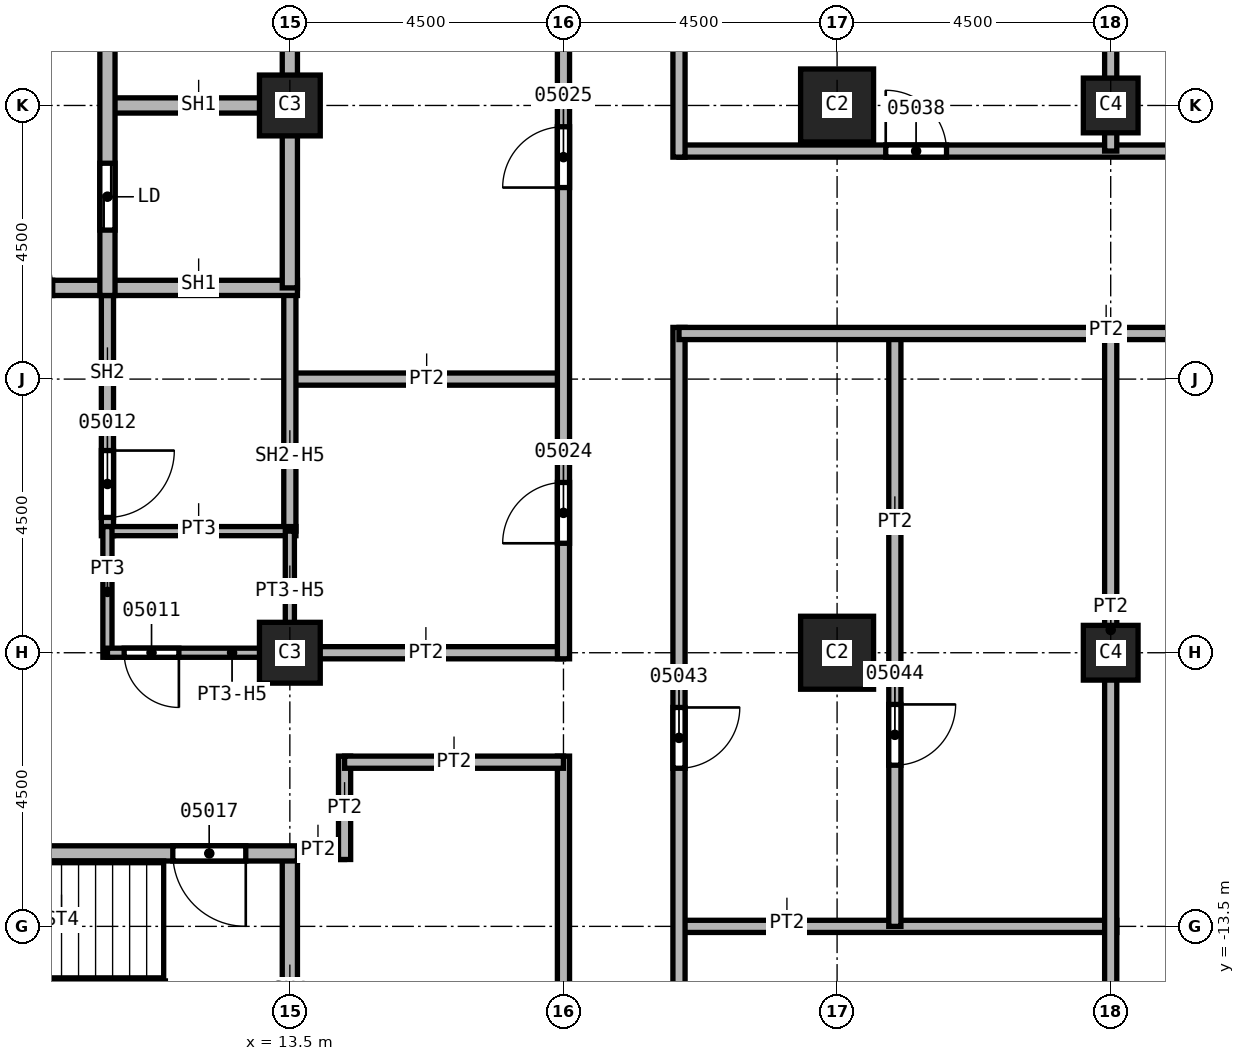
"""IFC4 building model, lengths in metres.
Left out: names, types, materials, properties, quantities, classifications, styles, units other than length and angle.
Written with IfcOpenShell. Run it as: python <this file> out.ifc"""

import sys

from ifc_helpers import new_model, si_unit, direction, frame, frame_2d, origin, origin_2d, place, context, subcontext, project, spatial, rectangle, extrude, element, fill, save


model = new_model("IFC4")
c1 = context("Model", 3, precision=1e-05, world=origin(), true_north=direction((0.0, 1.0)))
c2 = subcontext(c1, "Body", "Model", "MODEL_VIEW")
j1 = project(units=[si_unit("LENGTHUNIT", "METRE"), si_unit("PLANEANGLEUNIT", "RADIAN")], contexts=[c1])
p1 = place(None, origin())
s1 = spatial("IfcSite", under=j1, at=p1, CompositionType="ELEMENT")
p2 = place(p1, origin())
s2 = spatial("IfcBuilding", under=s1, at=p2, CompositionType="ELEMENT")
p3 = place(p2, frame((0.0, 0.0, 116.0)))
s3 = spatial("IfcBuildingStorey", under=s2, at=p3, CompositionType="ELEMENT", Elevation=116.0)
for number, where, z_axis, x_axis in (
    (1, (22.5, 0.0, 0.0), (0.0, 0.0, 1.0), (1.0, 0.0, 0.0)),
    (2, (22.5, -9.0, 0.0), (0.0, 0.0, 1.0), (1.0, 0.0, 0.0)),
):
    element("IfcColumn", number, at=place(p3, frame(where, z_axis=z_axis, x_axis=x_axis)), inside=s3, PredefinedType="COLUMN", context=c2, shape_type="SweptSolid", body=[
        extrude(rectangle(XDim=1.2, YDim=1.2, at=origin_2d()), origin(), (0.0, 0.0, 1.0), 3.6),
    ])
for number, where, z_axis, x_axis in (
    (3, (13.5, 0.0, 0.0), (0.0, 0.0, 1.0), (1.0, 0.0, 0.0)),
    (4, (13.5, -9.0, 0.0), (0.0, 0.0, 1.0), (1.0, 0.0, 0.0)),
):
    element("IfcColumn", number, at=place(p3, frame(where, z_axis=z_axis, x_axis=x_axis)), inside=s3, PredefinedType="COLUMN", context=c2, shape_type="SweptSolid", body=[
        extrude(rectangle(XDim=1.0, YDim=1.0, at=origin_2d()), origin(), (0.0, 0.0, 1.0), 3.6),
    ])
for number, where, z_axis, x_axis in (
    (5, (27.0, 0.0, 0.0), (0.0, 0.0, 1.0), (1.0, 0.0, 0.0)),
    (6, (27.0, -9.0, 0.0), (0.0, 0.0, 1.0), (1.0, 0.0, 0.0)),
):
    element("IfcColumn", number, at=place(p3, frame(where, z_axis=z_axis, x_axis=x_axis)), inside=s3, PredefinedType="COLUMN", context=c2, shape_type="SweptSolid", body=[
        extrude(rectangle(XDim=0.9, YDim=0.9, at=origin_2d()), origin(), (0.0, 0.0, 1.0), 3.6),
    ])
for number, where, z_axis, x_axis in (
    (7, (13.5, -9.0, 0.0), (0.0, 0.0, 1.0), (1.0, 0.0, 0.0)),
    (8, (13.5, -4.5, 0.0), (0.0, 0.0, 1.0), (1.0, 0.0, 0.0)),
):
    element("IfcWall", number, at=place(p3, frame(where, z_axis=z_axis, x_axis=x_axis)), inside=s3, PredefinedType="PARTITIONING", context=c2, shape_type="SweptSolid", body=[
        extrude(rectangle(XDim=4.5, YDim=0.2, at=frame_2d((2.25, 0.0))), origin(), (0.0, 0.0, 1.0), 3.6),
    ])
p4 = place(p3, frame((14.4, -12.3, 0.0), z_axis=(0.0, 0.0, 1.0), x_axis=(-1.0, 0.0, 0.0)))
e9 = element("IfcWall", 9, at=p4, inside=s3, PredefinedType="PARTITIONING", context=c2, shape_type="SweptSolid", body=[
    extrude(rectangle(XDim=1.025, YDim=0.2, at=frame_2d((0.512, 0.0))), origin(), (0.0, 0.0, 1.0), 3.6),
])
p5 = place(p3, frame((14.4, -10.7, 0.0), z_axis=(0.0, 0.0, 1.0), x_axis=(0.0, -1.0, 0.0)))
e10 = element("IfcWall", 10, at=p5, inside=s3, PredefinedType="PARTITIONING", context=c2, shape_type="SweptSolid", body=[
    extrude(rectangle(XDim=1.7, YDim=0.2, at=frame_2d((0.85, 0.0))), origin(), (0.0, 0.0, 1.0), 3.6),
])
p6 = place(p3, frame((18.0, -24.2, 0.0), z_axis=(0.0, 0.0, 1.0), x_axis=(0.0, 1.0, 0.0)))
e11 = element("IfcWall", 11, at=p6, inside=s3, PredefinedType="PARTITIONING", context=c2, shape_type="SweptSolid", body=[
    extrude(rectangle(XDim=13.5, YDim=0.2, at=frame_2d((6.75, 0.0))), origin(), (0.0, 0.0, 1.0), 3.6),
])
p7 = place(p6, frame((6.4, 0.0, 0.0)))
e12 = element("IfcOpeningElement", 12, at=p7, cuts=e11, PredefinedType="OPENING", context=c2, shape_type="SweptSolid", body=[
    extrude(rectangle(XDim=1.0, YDim=2.1, at=frame_2d((0.5, 1.05))), frame((0.0, 0.1, 0.0), z_axis=(0.0, -1.0, 0.0), x_axis=(1.0, 0.0, 0.0)), (0.0, 0.0, 1.0), 0.2),
])
p8 = place(p3, frame((18.0, -10.8, 0.0), z_axis=(0.0, 0.0, 1.0), x_axis=(-1.0, 0.0, 0.0)))
e13 = element("IfcWall", 13, at=p8, inside=s3, PredefinedType="PARTITIONING", context=c2, shape_type="SweptSolid", body=[
    extrude(rectangle(XDim=3.6, YDim=0.2, at=frame_2d((1.8, 0.0))), origin(), (0.0, 0.0, 1.0), 3.6),
])
p9 = place(p3, frame((18.0, -9.1, 0.0), z_axis=(0.0, 0.0, 1.0), x_axis=(0.0, 1.0, 0.0)))
e14 = element("IfcWall", 14, at=p9, inside=s3, PredefinedType="PARTITIONING", context=c2, shape_type="SweptSolid", body=[
    extrude(rectangle(XDim=18.2, YDim=0.2, at=frame_2d((9.1, 0.0))), origin(), (0.0, 0.0, 1.0), 3.6),
])
p10 = place(p9, frame((1.9, 0.0, 0.0)))
e15 = element("IfcOpeningElement", 15, at=p10, cuts=e14, PredefinedType="OPENING", context=c2, shape_type="SweptSolid", body=[
    extrude(rectangle(XDim=1.0, YDim=2.1, at=frame_2d((0.5, 1.05))), frame((0.0, 0.1, 0.0), z_axis=(0.0, -1.0, 0.0), x_axis=(1.0, 0.0, 0.0)), (0.0, 0.0, 1.0), 0.2),
])
p11 = place(p9, frame((7.75, 0.0, 0.0)))
e16 = element("IfcOpeningElement", 16, at=p11, cuts=e14, PredefinedType="OPENING", context=c2, shape_type="SweptSolid", body=[
    extrude(rectangle(XDim=1.0, YDim=2.1, at=frame_2d((0.5, 1.05))), frame((0.0, 0.1, 0.0), z_axis=(0.0, -1.0, 0.0), x_axis=(1.0, 0.0, 0.0)), (0.0, 0.0, 1.0), 0.2),
])
p12 = place(p9, frame((13.75, 0.0, 0.0)))
e17 = element("IfcOpeningElement", 17, at=p12, cuts=e14, PredefinedType="OPENING", context=c2, shape_type="SweptSolid", body=[
    extrude(rectangle(XDim=1.0, YDim=2.1, at=frame_2d((0.5, 1.05))), frame((0.0, 0.1, 0.0), z_axis=(0.0, -1.0, 0.0), x_axis=(1.0, 0.0, 0.0)), (0.0, 0.0, 1.0), 0.2),
])
p13 = place(p3, frame((19.9, -13.5, 0.0), z_axis=(0.0, 0.0, 1.0), x_axis=(1.0, 0.0, 0.0)))
e18 = element("IfcWall", 18, at=p13, inside=s3, PredefinedType="PARTITIONING", context=c2, shape_type="SweptSolid", body=[
    extrude(rectangle(XDim=7.2, YDim=0.2, at=frame_2d((3.6, 0.0))), origin(), (0.0, 0.0, 1.0), 3.6),
])
p14 = place(p3, frame((19.9, -3.65, 0.0), z_axis=(0.0, 0.0, 1.0), x_axis=(0.0, -1.0, 0.0)))
e19 = element("IfcWall", 19, at=p14, inside=s3, PredefinedType="PARTITIONING", context=c2, shape_type="SweptSolid", body=[
    extrude(rectangle(XDim=20.85, YDim=0.2, at=frame_2d((10.425, 0.0))), origin(), (0.0, 0.0, 1.0), 3.6),
])
p15 = place(p14, frame((17.5, 0.0, 0.0)))
e20 = element("IfcOpeningElement", 20, at=p15, cuts=e19, PredefinedType="OPENING", context=c2, shape_type="SweptSolid", body=[
    extrude(rectangle(XDim=1.0, YDim=2.1, at=frame_2d((0.5, 1.05))), frame((0.0, 0.1, 0.0), z_axis=(0.0, -1.0, 0.0), x_axis=(1.0, 0.0, 0.0)), (0.0, 0.0, 1.0), 0.2),
])
p16 = place(p14, frame((6.25, 0.0, 0.0)))
e21 = element("IfcOpeningElement", 21, at=p16, cuts=e19, PredefinedType="OPENING", context=c2, shape_type="SweptSolid", body=[
    extrude(rectangle(XDim=1.0, YDim=2.1, at=frame_2d((0.5, 1.05))), frame((0.0, 0.1, 0.0), z_axis=(0.0, -1.0, 0.0), x_axis=(1.0, 0.0, 0.0)), (0.0, 0.0, 1.0), 0.2),
])
p17 = place(p3, frame((19.9, -0.75, 0.0), z_axis=(0.0, 0.0, 1.0), x_axis=(1.0, 0.0, 0.0)))
e22 = element("IfcWall", 22, at=p17, inside=s3, PredefinedType="PARTITIONING", context=c2, shape_type="SweptSolid", body=[
    extrude(rectangle(XDim=13.95, YDim=0.2, at=frame_2d((6.975, 0.0))), origin(), (0.0, 0.0, 1.0), 3.6),
])
p18 = place(p17, frame((3.4, 0.0, 0.0)))
e23 = element("IfcOpeningElement", 23, at=p18, cuts=e22, PredefinedType="OPENING", context=c2, shape_type="SweptSolid", body=[
    extrude(rectangle(XDim=1.0, YDim=2.1, at=frame_2d((0.5, 1.05))), frame((0.0, 0.1, 0.0), z_axis=(0.0, -1.0, 0.0), x_axis=(1.0, 0.0, 0.0)), (0.0, 0.0, 1.0), 0.2),
])
p19 = place(p3, frame((19.9, 24.5, 0.0), z_axis=(0.0, 0.0, 1.0), x_axis=(0.0, -1.0, 0.0)))
e24 = element("IfcWall", 24, at=p19, inside=s3, PredefinedType="PARTITIONING", context=c2, shape_type="SweptSolid", body=[
    extrude(rectangle(XDim=25.35, YDim=0.2, at=frame_2d((12.675, 0.0))), origin(), (0.0, 0.0, 1.0), 3.6),
])
p20 = place(p19, frame((15.2, 0.0, 0.0)))
e25 = element("IfcOpeningElement", 25, at=p20, cuts=e24, PredefinedType="OPENING", context=c2, shape_type="SweptSolid", body=[
    extrude(rectangle(XDim=1.0, YDim=2.1, at=frame_2d((0.5, 1.05))), frame((0.0, 0.1, 0.0), z_axis=(0.0, -1.0, 0.0), x_axis=(1.0, 0.0, 0.0)), (0.0, 0.0, 1.0), 0.2),
])
p21 = place(p19, frame((7.55, 0.0, 0.0)))
e26 = element("IfcOpeningElement", 26, at=p21, cuts=e24, PredefinedType="OPENING", context=c2, shape_type="SweptSolid", body=[
    extrude(rectangle(XDim=1.0, YDim=2.1, at=frame_2d((0.5, 1.05))), frame((0.0, 0.1, 0.0), z_axis=(0.0, -1.0, 0.0), x_axis=(1.0, 0.0, 0.0)), (0.0, 0.0, 1.0), 0.2),
])
p22 = place(p19, frame((0.55, 0.0, 0.0)))
e27 = element("IfcOpeningElement", 27, at=p22, cuts=e24, PredefinedType="OPENING", context=c2, shape_type="SweptSolid", body=[
    extrude(rectangle(XDim=1.0, YDim=2.1, at=frame_2d((0.5, 1.05))), frame((0.0, 0.1, 0.0), z_axis=(0.0, -1.0, 0.0), x_axis=(1.0, 0.0, 0.0)), (0.0, 0.0, 1.0), 0.2),
])
p23 = place(p3, frame((23.45, -3.75, 0.0), z_axis=(0.0, 0.0, 1.0), x_axis=(0.0, -1.0, 0.0)))
e28 = element("IfcWall", 28, at=p23, inside=s3, PredefinedType="PARTITIONING", context=c2, shape_type="SweptSolid", body=[
    extrude(rectangle(XDim=9.75, YDim=0.2, at=frame_2d((4.875, 0.0))), origin(), (0.0, 0.0, 1.0), 3.6),
])
p24 = place(p23, frame((6.1, 0.0, 0.0)))
e29 = element("IfcOpeningElement", 29, at=p24, cuts=e28, PredefinedType="OPENING", context=c2, shape_type="SweptSolid", body=[
    extrude(rectangle(XDim=1.0, YDim=2.1, at=frame_2d((0.5, 1.05))), frame((0.0, 0.1, 0.0), z_axis=(0.0, -1.0, 0.0), x_axis=(1.0, 0.0, 0.0)), (0.0, 0.0, 1.0), 0.2),
])
p25 = place(p3, frame((33.85, -3.75, 0.0), z_axis=(0.0, 0.0, 1.0), x_axis=(-1.0, 0.0, 0.0)))
e30 = element("IfcWall", 30, at=p25, inside=s3, PredefinedType="PARTITIONING", context=c2, shape_type="SweptSolid", body=[
    extrude(rectangle(XDim=13.95, YDim=0.2, at=frame_2d((6.975, 0.0))), origin(), (0.0, 0.0, 1.0), 3.6),
])
p26 = place(p3, frame((27.0, -3.75, 0.0), z_axis=(0.0, 0.0, 1.0), x_axis=(0.0, -1.0, 0.0)))
e31 = element("IfcWall", 31, at=p26, inside=s3, PredefinedType="PARTITIONING", context=c2, shape_type="SweptSolid", body=[
    extrude(rectangle(XDim=13.65, YDim=0.2, at=frame_2d((6.825, 0.0))), origin(), (0.0, 0.0, 1.0), 3.6),
])
p27 = place(p3, frame((27.0, 17.4, 0.0), z_axis=(0.0, 0.0, 1.0), x_axis=(0.0, -1.0, 0.0)))
e32 = element("IfcWall", 32, at=p27, inside=s3, PredefinedType="PARTITIONING", context=c2, shape_type="SweptSolid", body=[
    extrude(rectangle(XDim=18.15, YDim=0.2, at=frame_2d((9.075, 0.0))), origin(), (0.0, 0.0, 1.0), 3.6),
])
p28 = place(p3, frame((10.5, -2.875, 0.0), z_axis=(0.0, 0.0, 1.0), x_axis=(0.0, -1.0, 0.0)))
e33 = element("IfcWall", 33, at=p28, inside=s3, PredefinedType="SOLIDWALL", context=c2, shape_type="SweptSolid", body=[
    extrude(rectangle(XDim=4.2, YDim=0.2, at=frame_2d((2.1, 0.0))), origin(), (0.0, 0.0, 1.0), 3.6),
])
p29 = place(p28, frame((2.8, 0.0, 0.0)))
e34 = element("IfcOpeningElement", 34, at=p29, cuts=e33, PredefinedType="OPENING", context=c2, shape_type="SweptSolid", body=[
    extrude(rectangle(XDim=1.1, YDim=2.1, at=frame_2d((0.55, 1.05))), frame((0.0, 0.1, 0.0), z_axis=(0.0, -1.0, 0.0), x_axis=(1.0, 0.0, 0.0)), (0.0, 0.0, 1.0), 0.2),
])
p30 = place(p3, frame((13.5, -3.0, 0.0), z_axis=(0.0, 0.0, 1.0), x_axis=(0.0, -1.0, 0.0)))
e35 = element("IfcWall", 35, at=p30, inside=s3, PredefinedType="SOLIDWALL", context=c2, shape_type="SweptSolid", body=[
    extrude(rectangle(XDim=4.0, YDim=0.2, at=frame_2d((2.0, 0.0))), origin(), (0.0, 0.0, 1.0), 2.838),
])
p31 = place(p3, frame((7.5, -3.0, 0.0), z_axis=(0.0, 0.0, 1.0), x_axis=(1.0, 0.0, 0.0)))
e36 = element("IfcWall", 36, at=p31, inside=s3, PredefinedType="SOLIDWALL", context=c2, shape_type="SweptSolid", body=[
    extrude(rectangle(XDim=6.125, YDim=0.25, at=frame_2d((3.062, 0.0))), origin(), (0.0, 0.0, 1.0), 3.6),
])
p32 = place(p31, frame((1.0, 0.0, 0.0)))
e37 = element("IfcOpeningElement", 37, at=p32, cuts=e36, PredefinedType="OPENING", context=c2, shape_type="SweptSolid", body=[
    extrude(rectangle(XDim=1.1, YDim=2.1, at=frame_2d((0.55, 1.05))), frame((0.0, 0.125, 0.0), z_axis=(0.0, -1.0, 0.0), x_axis=(1.0, 0.0, 0.0)), (0.0, 0.0, 1.0), 0.25),
])
p33 = place(p3, frame((10.5, 0.0, 0.0), z_axis=(0.0, 0.0, 1.0), x_axis=(1.0, 0.0, 0.0)))
e38 = element("IfcWall", 38, at=p33, inside=s3, PredefinedType="SOLIDWALL", context=c2, shape_type="SweptSolid", body=[
    extrude(rectangle(XDim=3.125, YDim=0.25, at=frame_2d((1.562, 0.0))), origin(), (0.0, 0.0, 1.0), 3.6),
])
p34 = place(p3, frame((10.5, 6.125, 0.0), z_axis=(0.0, 0.0, 1.0), x_axis=(0.0, -1.0, 0.0)))
e39 = element("IfcWall", 39, at=p34, inside=s3, PredefinedType="SOLIDWALL", context=c2, shape_type="SweptSolid", body=[
    extrude(rectangle(XDim=9.25, YDim=0.25, at=frame_2d((4.625, 0.0))), origin(), (0.0, 0.0, 1.0), 3.6),
])
p35 = place(p34, frame((7.075, 0.0, 0.0)))
e40 = element("IfcOpeningElement", 40, at=p35, cuts=e39, PredefinedType="OPENING", context=c2, shape_type="SweptSolid", body=[
    extrude(rectangle(XDim=1.1, YDim=2.1, at=frame_2d((0.55, 1.05))), frame((0.0, 0.125, 0.0), z_axis=(0.0, -1.0, 0.0), x_axis=(1.0, 0.0, 0.0)), (0.0, 0.0, 1.0), 0.25),
])
p36 = place(p34, frame((4.075, 0.0, 0.0)))
e41 = element("IfcOpeningElement", 41, at=p36, cuts=e39, PredefinedType="OPENING", context=c2, shape_type="SweptSolid", body=[
    extrude(rectangle(XDim=1.1, YDim=2.1, at=frame_2d((0.55, 1.05))), frame((0.0, 0.125, 0.0), z_axis=(0.0, -1.0, 0.0), x_axis=(1.0, 0.0, 0.0)), (0.0, 0.0, 1.0), 0.25),
])
p37 = place(p3, frame((13.5, 6.0, 0.0), z_axis=(0.0, 0.0, 1.0), x_axis=(0.0, -1.0, 0.0)))
e42 = element("IfcWall", 42, at=p37, inside=s3, PredefinedType="SOLIDWALL", context=c2, shape_type="SweptSolid", body=[
    extrude(rectangle(XDim=9.0, YDim=0.25, at=frame_2d((4.5, 0.0))), origin(), (0.0, 0.0, 1.0), 2.838),
])
p38 = place(p3, frame((13.5, -12.3, 0.0), z_axis=(0.0, 0.0, 1.0), x_axis=(0.0, -1.0, 0.0)))
e43 = element("IfcWall", 43, at=p38, inside=s3, PredefinedType="SOLIDWALL", context=c2, shape_type="SweptSolid", body=[
    extrude(rectangle(XDim=4.625, YDim=0.25, at=frame_2d((2.312, 0.0))), origin(), (0.0, 0.0, 1.0), 3.6),
])
p39 = place(p3, frame((13.625, -12.3, 0.0), z_axis=(0.0, 0.0, 1.0), x_axis=(-1.0, 0.0, 0.0)))
e44 = element("IfcWall", 44, at=p39, inside=s3, PredefinedType="SOLIDWALL", context=c2, shape_type="SweptSolid", body=[
    extrude(rectangle(XDim=9.25, YDim=0.25, at=frame_2d((4.625, 0.0))), origin(), (0.0, 0.0, 1.0), 3.6),
])
p40 = place(p39, frame((0.85, 0.0, 0.0)))
e45 = element("IfcOpeningElement", 45, at=p40, cuts=e44, PredefinedType="OPENING", context=c2, shape_type="SweptSolid", body=[
    extrude(rectangle(XDim=1.2, YDim=2.1, at=frame_2d((0.6, 1.05))), frame((0.0, 0.125, 0.0), z_axis=(0.0, -1.0, 0.0), x_axis=(1.0, 0.0, 0.0)), (0.0, 0.0, 1.0), 0.25),
])
p41 = place(p3, frame((10.5, -7.0, 0.0), z_axis=(0.0, 0.0, 1.0), x_axis=(1.0, 0.0, 0.0)))
e46 = element("IfcWall", 46, at=p41, inside=s3, PredefinedType="PARTITIONING", context=c2, shape_type="SweptSolid", body=[
    extrude(rectangle(XDim=3.1, YDim=0.15, at=frame_2d((1.55, 0.0))), origin(), (0.0, 0.0, 1.0), 3.6),
])
p42 = place(p3, frame((10.5, -6.925, 0.0), z_axis=(0.0, 0.0, 1.0), x_axis=(0.0, -1.0, 0.0)))
e47 = element("IfcWall", 47, at=p42, inside=s3, PredefinedType="PARTITIONING", context=c2, shape_type="SweptSolid", body=[
    extrude(rectangle(XDim=2.15, YDim=0.15, at=frame_2d((1.075, 0.0))), origin(), (0.0, 0.0, 1.0), 3.6),
])
p43 = place(p3, frame((13.5, -7.0, 0.0), z_axis=(0.0, 0.0, 1.0), x_axis=(0.0, -1.0, 0.0)))
e48 = element("IfcWall", 48, at=p43, inside=s3, PredefinedType="PARTITIONING", context=c2, shape_type="SweptSolid", body=[
    extrude(rectangle(XDim=2.1, YDim=0.15, at=frame_2d((1.05, 0.0))), origin(), (0.0, 0.0, 1.0), 2.838),
])
p44 = place(p3, frame((13.575, -9.0, 0.0), z_axis=(0.0, 0.0, 1.0), x_axis=(-1.0, 0.0, 0.0)))
e49 = element("IfcWall", 49, at=p44, inside=s3, PredefinedType="PARTITIONING", context=c2, shape_type="SweptSolid", body=[
    extrude(rectangle(XDim=3.075, YDim=0.15, at=frame_2d((1.538, 0.0))), origin(), (0.0, 0.0, 1.0), 2.838),
])
p45 = place(p44, frame((1.9, 0.0, 0.0)))
e50 = element("IfcOpeningElement", 50, at=p45, cuts=e49, PredefinedType="OPENING", context=c2, shape_type="SweptSolid", body=[
    extrude(rectangle(XDim=0.9, YDim=2.1, at=frame_2d((0.45, 1.05))), frame((0.0, 0.075, 0.0), z_axis=(0.0, -1.0, 0.0), x_axis=(1.0, 0.0, 0.0)), (0.0, 0.0, 1.0), 0.15),
])
p46 = place(p45, origin())
e51 = element("IfcDoor", 51, at=p46, inside=s3, OperationType="SINGLE_SWING_RIGHT", PredefinedType="DOOR", context=c2, shape_type="SweptSolid", body=[
    extrude(rectangle(XDim=0.9, YDim=2.1, at=frame_2d((0.45, 1.05))), frame((0.0, 0.025, 0.0), z_axis=(0.0, -1.0, 0.0), x_axis=(1.0, 0.0, 0.0)), (0.0, 0.0, 1.0), 0.05),
])
fill(e50, e51)
p47 = place(p29, origin())
e52 = element("IfcDoor", 52, at=p47, inside=s3, OperationType="SINGLE_SWING_LEFT", PredefinedType="DOOR", context=c2, shape_type="SweptSolid", body=[
    extrude(rectangle(XDim=1.1, YDim=2.1, at=frame_2d((0.55, 1.05))), frame((0.0, 0.025, 0.0), z_axis=(0.0, -1.0, 0.0), x_axis=(1.0, 0.0, 0.0)), (0.0, 0.0, 1.0), 0.05),
])
fill(e34, e52)
p48 = place(p40, origin())
e53 = element("IfcDoor", 53, at=p48, inside=s3, OperationType="SINGLE_SWING_RIGHT", PredefinedType="DOOR", context=c2, shape_type="SweptSolid", body=[
    extrude(rectangle(XDim=1.2, YDim=2.1, at=frame_2d((0.6, 1.05))), frame((0.0, 0.025, 0.0), z_axis=(0.0, -1.0, 0.0), x_axis=(1.0, 0.0, 0.0)), (0.0, 0.0, 1.0), 0.05),
])
fill(e45, e53)
p49 = place(p10, origin())
e54 = element("IfcDoor", 54, at=p49, inside=s3, OperationType="SINGLE_SWING_LEFT", PredefinedType="DOOR", context=c2, shape_type="SweptSolid", body=[
    extrude(rectangle(XDim=1.0, YDim=2.1, at=frame_2d((0.5, 1.05))), frame((0.0, 0.025, 0.0), z_axis=(0.0, -1.0, 0.0), x_axis=(1.0, 0.0, 0.0)), (0.0, 0.0, 1.0), 0.05),
])
fill(e15, e54)
p50 = place(p11, origin())
e55 = element("IfcDoor", 55, at=p50, inside=s3, OperationType="SINGLE_SWING_RIGHT", PredefinedType="DOOR", context=c2, shape_type="SweptSolid", body=[
    extrude(rectangle(XDim=1.0, YDim=2.1, at=frame_2d((0.5, 1.05))), frame((0.0, 0.025, 0.0), z_axis=(0.0, -1.0, 0.0), x_axis=(1.0, 0.0, 0.0)), (0.0, 0.0, 1.0), 0.05),
])
fill(e16, e55)
p51 = place(p18, origin())
e56 = element("IfcDoor", 56, at=p51, inside=s3, OperationType="SINGLE_SWING_LEFT", PredefinedType="DOOR", context=c2, shape_type="SweptSolid", body=[
    extrude(rectangle(XDim=1.0, YDim=2.1, at=frame_2d((0.5, 1.05))), frame((0.0, 0.025, 0.0), z_axis=(0.0, -1.0, 0.0), x_axis=(1.0, 0.0, 0.0)), (0.0, 0.0, 1.0), 0.05),
])
fill(e23, e56)
p52 = place(p16, origin())
e57 = element("IfcDoor", 57, at=p52, inside=s3, OperationType="SINGLE_SWING_RIGHT", PredefinedType="DOOR", context=c2, shape_type="SweptSolid", body=[
    extrude(rectangle(XDim=1.0, YDim=2.1, at=frame_2d((0.5, 1.05))), frame((0.0, 0.025, 0.0), z_axis=(0.0, -1.0, 0.0), x_axis=(1.0, 0.0, 0.0)), (0.0, 0.0, 1.0), 0.05),
])
fill(e21, e57)
p53 = place(p24, origin())
e58 = element("IfcDoor", 58, at=p53, inside=s3, OperationType="SINGLE_SWING_LEFT", PredefinedType="DOOR", context=c2, shape_type="SweptSolid", body=[
    extrude(rectangle(XDim=1.0, YDim=2.1, at=frame_2d((0.5, 1.05))), frame((0.0, 0.025, 0.0), z_axis=(0.0, -1.0, 0.0), x_axis=(1.0, 0.0, 0.0)), (0.0, 0.0, 1.0), 0.05),
])
fill(e29, e58)
p54 = place(p35, origin())
e59 = element("IfcDoor", 59, at=p54, inside=s3, OperationType="SLIDING_TO_LEFT", PredefinedType="DOOR", context=c2, shape_type="SweptSolid", body=[
    extrude(rectangle(XDim=1.1, YDim=2.1, at=frame_2d((0.55, 1.05))), frame((0.0, 0.025, 0.0), z_axis=(0.0, -1.0, 0.0), x_axis=(1.0, 0.0, 0.0)), (0.0, 0.0, 1.0), 0.05),
])
fill(e40, e59)
save(model, sys.argv[1])
